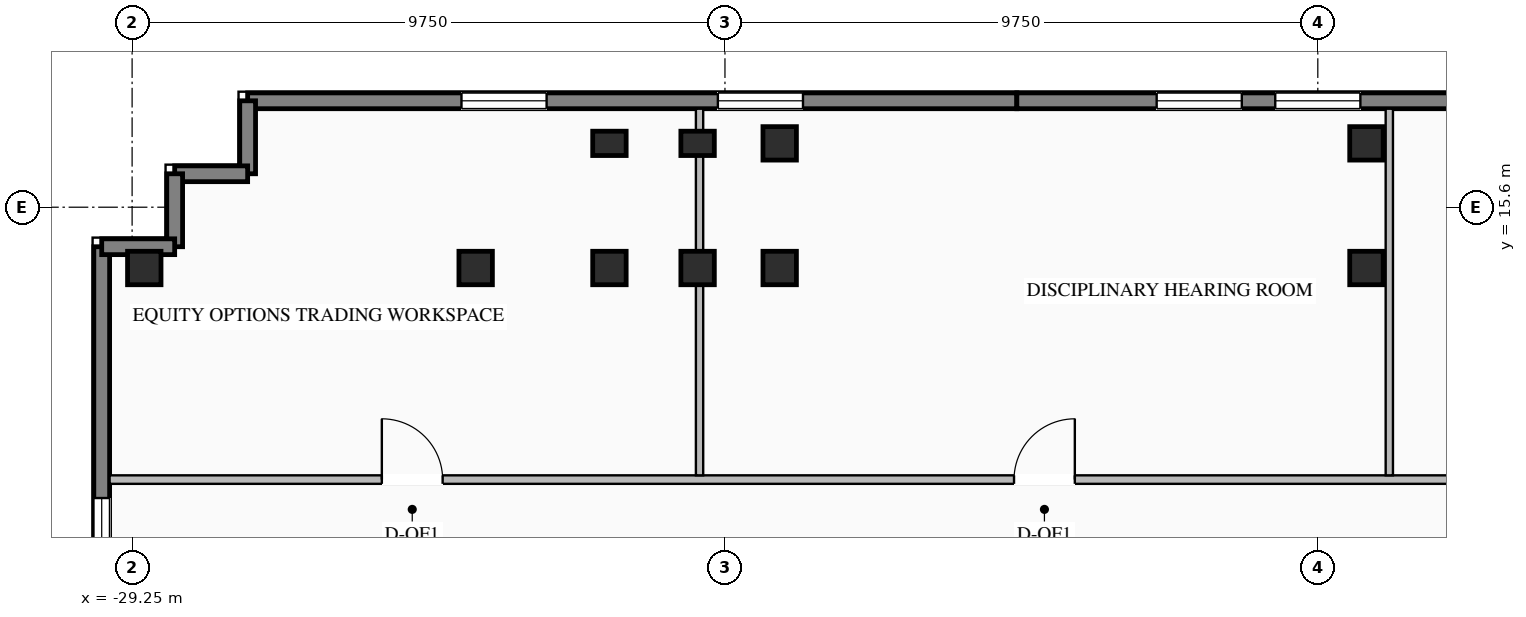
"""IFC4 building model, lengths in metres.
Left out: names, types, materials, properties, quantities, classifications, styles, units other than length and angle.
Written with IfcOpenShell. Run it as: python <this file> out.ifc"""

import sys

from ifc_helpers import new_model, si_unit, direction, frame, frame_2d, origin, origin_2d, place, context, subcontext, project, spatial, rectangle, i_section, extrude, element, fill, save


model = new_model("IFC4")
c1 = context("Model", 3, precision=1e-05, world=origin(), true_north=direction((0.0, 1.0)))
c2 = subcontext(c1, "Body", "Model", "MODEL_VIEW")
j1 = project(units=[si_unit("LENGTHUNIT", "METRE"), si_unit("PLANEANGLEUNIT", "RADIAN")], contexts=[c1])
p1 = place(None, origin())
s1 = spatial("IfcSite", under=j1, at=p1, CompositionType="ELEMENT")
p2 = place(p1, origin())
s2 = spatial("IfcBuilding", under=s1, at=p2, CompositionType="ELEMENT")
p3 = place(p2, frame((0.0, 0.0, 218.85)))
s3 = spatial("IfcBuildingStorey", under=s2, at=p3, CompositionType="ELEMENT", Elevation=218.85)
for number, where, z_axis, x_axis in (
    (1, (-21.4, 14.6, 0.0), (0.0, 0.0, 1.0), (1.0, 0.0, 0.0)),
    (2, (-19.95, 14.6, 0.0), (0.0, 0.0, 1.0), (1.0, 0.0, 0.0)),
    (3, (-18.6, 14.6, 0.0), (0.0, 0.0, 1.0), (1.0, 0.0, 0.0)),
    (4, (-8.95, 14.6, 0.0), (0.0, 0.0, 1.0), (1.0, 0.0, 0.0)),
    (5, (-23.6, 14.6, 0.0), (0.0, 0.0, 1.0), (1.0, 0.0, 0.0)),
    (6, (-18.6, 16.65, 0.0), (0.0, 0.0, 1.0), (1.0, 0.0, 0.0)),
    (7, (-8.95, 16.65, 0.0), (0.0, 0.0, 1.0), (1.0, 0.0, 0.0)),
    (8, (-29.05, 14.6, 0.0), (0.0, 0.0, 1.0), (1.0, 0.0, 0.0)),
):
    element("IfcColumn", number, at=place(p3, frame(where, z_axis=z_axis, x_axis=x_axis)), inside=s3, PredefinedType="COLUMN", context=c2, shape_type="SweptSolid", body=[
        extrude(i_section(OverallWidth=0.55, OverallDepth=0.55, WebThickness=0.024, FlangeThickness=0.036, at=origin_2d()), origin(), (0.0, 0.0, 1.0), 3.45),
    ])
for number, where, z_axis, x_axis in (
    (9, (-21.4, 16.65, 0.0), (0.0, 0.0, 1.0), (1.0, 0.0, 0.0)),
    (10, (-19.95, 16.65, 0.0), (0.0, 0.0, 1.0), (1.0, 0.0, 0.0)),
):
    element("IfcColumn", number, at=place(p3, frame(where, z_axis=z_axis, x_axis=x_axis)), inside=s3, PredefinedType="PILASTER", context=c2, shape_type="SweptSolid", body=[
        extrude(rectangle(XDim=0.55, YDim=0.4, at=origin_2d()), origin(), (0.0, 0.0, 1.0), 3.45),
    ])
p4 = place(p3, frame((-27.35, 17.35, 0.0), z_axis=(0.0, 0.0, 1.0), x_axis=(1.0, 0.0, 0.0)))
e11 = element("IfcWall", 11, at=p4, inside=s3, PredefinedType="STANDARD", context=c2, shape_type="SweptSolid", body=[
    extrude(rectangle(XDim=12.65, YDim=0.26, at=frame_2d((6.325, 0.0))), origin(), (0.0, 0.0, 1.0), 3.25),
])
p5 = place(p4, frame((3.517, 0.0, 0.76)))
e12 = element("IfcOpeningElement", 12, at=p5, cuts=e11, PredefinedType="OPENING", context=c2, shape_type="SweptSolid", body=[
    extrude(rectangle(XDim=1.4, YDim=1.95, at=frame_2d((0.7, 0.975))), frame((0.0, 0.14, 0.0), z_axis=(0.0, -1.0, 0.0), x_axis=(1.0, 0.0, 0.0)), (0.0, 0.0, 1.0), 0.28),
])
p6 = place(p4, frame((7.733, 0.0, 0.76)))
e13 = element("IfcOpeningElement", 13, at=p6, cuts=e11, PredefinedType="OPENING", context=c2, shape_type="SweptSolid", body=[
    extrude(rectangle(XDim=1.4, YDim=1.95, at=frame_2d((0.7, 0.975))), frame((0.0, 0.14, 0.0), z_axis=(0.0, -1.0, 0.0), x_axis=(1.0, 0.0, 0.0)), (0.0, 0.0, 1.0), 0.28),
])
p7 = place(p3, frame((-14.7, 17.35, 0.0), z_axis=(0.0, 0.0, 1.0), x_axis=(1.0, 0.0, 0.0)))
e14 = element("IfcWall", 14, at=p7, inside=s3, PredefinedType="STANDARD", context=c2, shape_type="SweptSolid", body=[
    extrude(rectangle(XDim=9.0, YDim=0.26, at=frame_2d((4.5, 0.0))), origin(), (0.0, 0.0, 1.0), 3.25),
])
p8 = place(p7, frame((2.3, 0.0, 0.76)))
e15 = element("IfcOpeningElement", 15, at=p8, cuts=e14, PredefinedType="OPENING", context=c2, shape_type="SweptSolid", body=[
    extrude(rectangle(XDim=1.4, YDim=1.95, at=frame_2d((0.7, 0.975))), frame((0.0, 0.14, 0.0), z_axis=(0.0, -1.0, 0.0), x_axis=(1.0, 0.0, 0.0)), (0.0, 0.0, 1.0), 0.28),
])
p9 = place(p7, frame((4.25, 0.0, 0.76)))
e16 = element("IfcOpeningElement", 16, at=p9, cuts=e14, PredefinedType="OPENING", context=c2, shape_type="SweptSolid", body=[
    extrude(rectangle(XDim=1.4, YDim=1.95, at=frame_2d((0.7, 0.975))), frame((0.0, 0.14, 0.0), z_axis=(0.0, -1.0, 0.0), x_axis=(1.0, 0.0, 0.0)), (0.0, 0.0, 1.0), 0.28),
])
p10 = place(p3, frame((-29.75, -0.9, 0.0), z_axis=(0.0, 0.0, 1.0), x_axis=(0.0, 1.0, 0.0)))
e17 = element("IfcWall", 17, at=p10, inside=s3, PredefinedType="STANDARD", context=c2, shape_type="SweptSolid", body=[
    extrude(rectangle(XDim=15.85, YDim=0.26, at=frame_2d((7.925, 0.0))), origin(), (0.0, 0.0, 1.0), 3.25),
])
p11 = place(p10, frame((4.683, 0.0, 0.76)))
e18 = element("IfcOpeningElement", 18, at=p11, cuts=e17, PredefinedType="OPENING", context=c2, shape_type="SweptSolid", body=[
    extrude(rectangle(XDim=1.2, YDim=1.95, at=frame_2d((0.6, 0.975))), frame((0.0, 0.14, 0.0), z_axis=(0.0, -1.0, 0.0), x_axis=(1.0, 0.0, 0.0)), (0.0, 0.0, 1.0), 0.28),
])
p12 = place(p10, frame((10.517, 0.0, 0.76)))
e19 = element("IfcOpeningElement", 19, at=p12, cuts=e17, PredefinedType="OPENING", context=c2, shape_type="SweptSolid", body=[
    extrude(rectangle(XDim=1.2, YDim=1.95, at=frame_2d((0.6, 0.975))), frame((0.0, 0.14, 0.0), z_axis=(0.0, -1.0, 0.0), x_axis=(1.0, 0.0, 0.0)), (0.0, 0.0, 1.0), 0.28),
])
p13 = place(p3, frame((-27.35, 17.35, 0.0), z_axis=(0.0, 0.0, 1.0), x_axis=(0.0, -1.0, 0.0)))
e20 = element("IfcWall", 20, at=p13, inside=s3, PredefinedType="STANDARD", context=c2, shape_type="SweptSolid", body=[
    extrude(rectangle(XDim=1.2, YDim=0.26, at=frame_2d((0.6, 0.0))), origin(), (0.0, 0.0, 1.0), 2.565),
])
for number, where, z_axis, x_axis in (
    (21, (-27.35, 16.15, 0.0), (0.0, 0.0, 1.0), (-1.0, 0.0, 0.0)),
    (22, (-28.55, 16.15, 0.0), (0.0, 0.0, 1.0), (0.0, -1.0, 0.0)),
    (23, (-28.55, 14.95, 0.0), (0.0, 0.0, 1.0), (-1.0, 0.0, 0.0)),
):
    element("IfcWall", number, at=place(p3, frame(where, z_axis=z_axis, x_axis=x_axis)), inside=s3, PredefinedType="STANDARD", context=c2, shape_type="SweptSolid", body=[
        extrude(rectangle(XDim=1.2, YDim=0.26, at=frame_2d((0.6, 0.0))), origin(), (0.0, 0.0, 1.0), 2.565),
    ])
p14 = place(p3, frame((-29.62, 11.12, 0.0), z_axis=(0.0, 0.0, 1.0), x_axis=(1.0, 0.0, 0.0)))
e24 = element("IfcWall", 24, at=p14, inside=s3, PredefinedType="STANDARD", context=c2, shape_type="SweptSolid", body=[
    extrude(rectangle(XDim=56.84, YDim=0.14, at=frame_2d((28.42, 0.0))), origin(), (0.0, 0.0, 1.0), 3.25),
])
p15 = place(p14, frame((4.477, 0.0, 0.0)))
e25 = element("IfcOpeningElement", 25, at=p15, cuts=e24, PredefinedType="OPENING", context=c2, shape_type="SweptSolid", body=[
    extrude(rectangle(XDim=1.0, YDim=2.08, at=frame_2d((0.5, 1.04))), frame((0.0, 0.08, 0.0), z_axis=(0.0, -1.0, 0.0), x_axis=(1.0, 0.0, 0.0)), (0.0, 0.0, 1.0), 0.16),
])
p16 = place(p14, frame((14.874, 0.0, 0.0)))
e26 = element("IfcOpeningElement", 26, at=p16, cuts=e24, PredefinedType="OPENING", context=c2, shape_type="SweptSolid", body=[
    extrude(rectangle(XDim=1.0, YDim=2.08, at=frame_2d((0.5, 1.04))), frame((0.0, 0.08, 0.0), z_axis=(0.0, -1.0, 0.0), x_axis=(1.0, 0.0, 0.0)), (0.0, 0.0, 1.0), 0.16),
])
p17 = place(p14, frame((26.785, 0.0, 0.0)))
e27 = element("IfcOpeningElement", 27, at=p17, cuts=e24, PredefinedType="OPENING", context=c2, shape_type="SweptSolid", body=[
    extrude(rectangle(XDim=1.0, YDim=2.08, at=frame_2d((0.5, 1.04))), frame((0.0, 0.08, 0.0), z_axis=(0.0, -1.0, 0.0), x_axis=(1.0, 0.0, 0.0)), (0.0, 0.0, 1.0), 0.16),
])
p18 = place(p14, frame((39.264, 0.0, 0.0)))
e28 = element("IfcOpeningElement", 28, at=p18, cuts=e24, PredefinedType="OPENING", context=c2, shape_type="SweptSolid", body=[
    extrude(rectangle(XDim=1.0, YDim=2.08, at=frame_2d((0.5, 1.04))), frame((0.0, 0.08, 0.0), z_axis=(0.0, -1.0, 0.0), x_axis=(1.0, 0.0, 0.0)), (0.0, 0.0, 1.0), 0.16),
])
p19 = place(p14, frame((50.795, 0.0, 0.0)))
e29 = element("IfcOpeningElement", 29, at=p19, cuts=e24, PredefinedType="OPENING", context=c2, shape_type="SweptSolid", body=[
    extrude(rectangle(XDim=1.0, YDim=2.08, at=frame_2d((0.5, 1.04))), frame((0.0, 0.08, 0.0), z_axis=(0.0, -1.0, 0.0), x_axis=(1.0, 0.0, 0.0)), (0.0, 0.0, 1.0), 0.16),
])
p20 = place(p3, frame((-19.918, 11.19, 0.0), z_axis=(0.0, 0.0, 1.0), x_axis=(0.0, 1.0, 0.0)))
e30 = element("IfcWall", 30, at=p20, inside=s3, PredefinedType="STANDARD", context=c2, shape_type="SweptSolid", body=[
    extrude(rectangle(XDim=6.03, YDim=0.12, at=frame_2d((3.015, 0.0))), origin(), (0.0, 0.0, 1.0), 2.645),
])
p21 = place(p3, frame((-8.574, 11.19, 0.0), z_axis=(0.0, 0.0, 1.0), x_axis=(0.0, 1.0, 0.0)))
e31 = element("IfcWall", 31, at=p21, inside=s3, PredefinedType="STANDARD", context=c2, shape_type="SweptSolid", body=[
    extrude(rectangle(XDim=6.03, YDim=0.12, at=frame_2d((3.015, 0.0))), origin(), (0.0, 0.0, 1.0), 3.25),
])
p22 = place(p5, origin())
e32 = element("IfcWindow", 32, at=p22, inside=s3, PartitioningType="SINGLE_PANEL", PredefinedType="WINDOW", context=c2, shape_type="SweptSolid", body=[
    extrude(rectangle(XDim=1.4, YDim=1.95, at=frame_2d((0.7, 0.975))), frame((0.0, 0.03, 0.0), z_axis=(0.0, -1.0, 0.0), x_axis=(1.0, 0.0, 0.0)), (0.0, 0.0, 1.0), 0.06),
])
fill(e12, e32)
p23 = place(p6, origin())
e33 = element("IfcWindow", 33, at=p23, inside=s3, PartitioningType="SINGLE_PANEL", PredefinedType="WINDOW", context=c2, shape_type="SweptSolid", body=[
    extrude(rectangle(XDim=1.4, YDim=1.95, at=frame_2d((0.7, 0.975))), frame((0.0, 0.03, 0.0), z_axis=(0.0, -1.0, 0.0), x_axis=(1.0, 0.0, 0.0)), (0.0, 0.0, 1.0), 0.06),
])
fill(e13, e33)
p24 = place(p8, origin())
e34 = element("IfcWindow", 34, at=p24, inside=s3, PartitioningType="SINGLE_PANEL", PredefinedType="WINDOW", context=c2, shape_type="SweptSolid", body=[
    extrude(rectangle(XDim=1.4, YDim=1.95, at=frame_2d((0.7, 0.975))), frame((0.0, 0.03, 0.0), z_axis=(0.0, -1.0, 0.0), x_axis=(1.0, 0.0, 0.0)), (0.0, 0.0, 1.0), 0.06),
])
fill(e15, e34)
p25 = place(p9, origin())
e35 = element("IfcWindow", 35, at=p25, inside=s3, PartitioningType="SINGLE_PANEL", PredefinedType="WINDOW", context=c2, shape_type="SweptSolid", body=[
    extrude(rectangle(XDim=1.4, YDim=1.95, at=frame_2d((0.7, 0.975))), frame((0.0, 0.03, 0.0), z_axis=(0.0, -1.0, 0.0), x_axis=(1.0, 0.0, 0.0)), (0.0, 0.0, 1.0), 0.06),
])
fill(e16, e35)
p26 = place(p12, origin())
e36 = element("IfcWindow", 36, at=p26, inside=s3, PartitioningType="SINGLE_PANEL", PredefinedType="WINDOW", context=c2, shape_type="SweptSolid", body=[
    extrude(rectangle(XDim=1.2, YDim=1.95, at=frame_2d((0.6, 0.975))), frame((0.0, 0.03, 0.0), z_axis=(0.0, -1.0, 0.0), x_axis=(1.0, 0.0, 0.0)), (0.0, 0.0, 1.0), 0.06),
])
fill(e19, e36)
p27 = place(p15, origin())
e37 = element("IfcDoor", 37, at=p27, inside=s3, OperationType="SINGLE_SWING_LEFT", PredefinedType="DOOR", context=c2, shape_type="SweptSolid", body=[
    extrude(rectangle(XDim=1.0, YDim=2.08, at=frame_2d((0.5, 1.04))), frame((0.0, 0.025, 0.0), z_axis=(0.0, -1.0, 0.0), x_axis=(1.0, 0.0, 0.0)), (0.0, 0.0, 1.0), 0.05),
])
fill(e25, e37)
p28 = place(p16, origin())
e38 = element("IfcDoor", 38, at=p28, inside=s3, OperationType="SINGLE_SWING_RIGHT", PredefinedType="DOOR", context=c2, shape_type="SweptSolid", body=[
    extrude(rectangle(XDim=1.0, YDim=2.08, at=frame_2d((0.5, 1.04))), frame((0.0, 0.025, 0.0), z_axis=(0.0, -1.0, 0.0), x_axis=(1.0, 0.0, 0.0)), (0.0, 0.0, 1.0), 0.05),
])
fill(e26, e38)
save(model, sys.argv[1])
